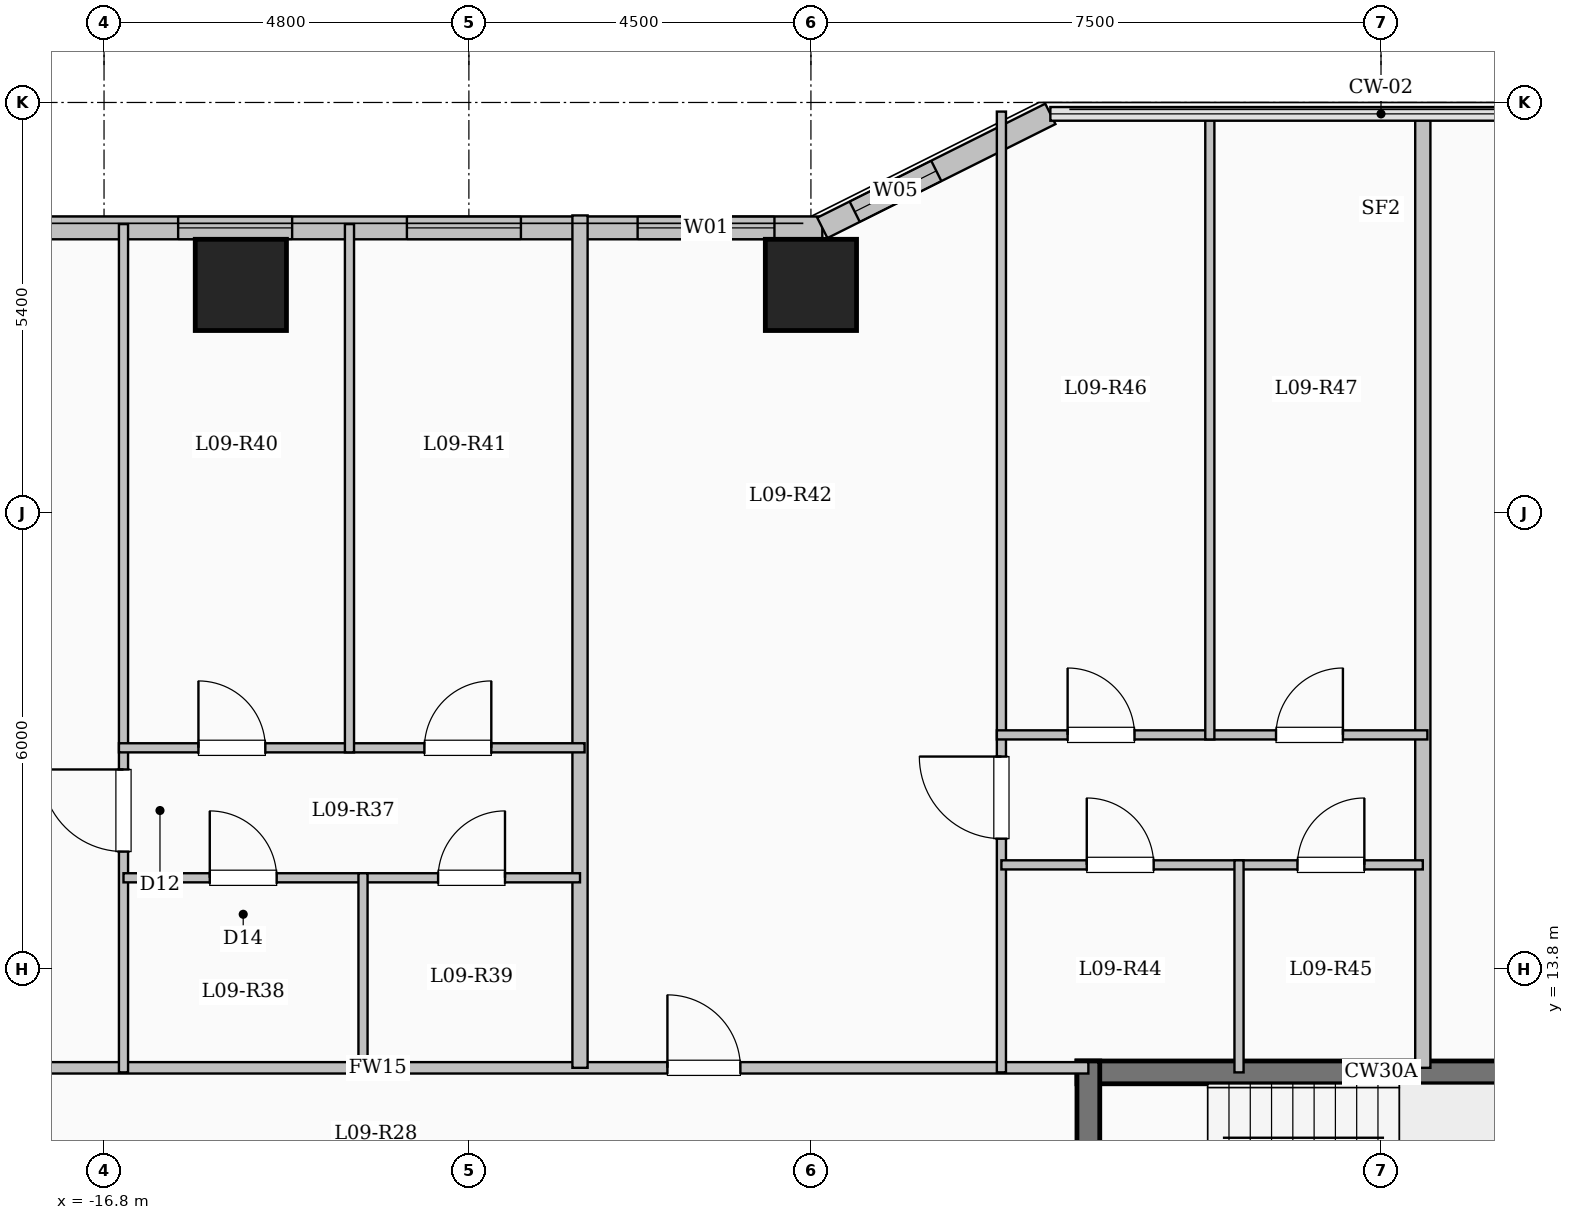
"""IFC4 building model, lengths in metres.
Left out: names, types, materials, properties, quantities, classifications, styles, units other than length and angle.
Written with IfcOpenShell. Run it as: python <this file> out.ifc"""

import sys

from ifc_helpers import new_model, si_unit, direction, frame, frame_2d, origin, origin_2d, place, context, subcontext, project, spatial, rectangle, extrude, element, fill, save


model = new_model("IFC4")
c1 = context("Model", 3, precision=1e-05, world=origin(), true_north=direction((0.0, 1.0)))
c2 = subcontext(c1, "Body", "Model", "MODEL_VIEW")
j1 = project(units=[si_unit("LENGTHUNIT", "METRE"), si_unit("PLANEANGLEUNIT", "RADIAN")], contexts=[c1])
p1 = place(None, origin())
s1 = spatial("IfcSite", under=j1, at=p1, CompositionType="ELEMENT")
p2 = place(p1, origin())
s2 = spatial("IfcBuilding", under=s1, at=p2, CompositionType="ELEMENT")
p3 = place(p2, frame((0.0, 0.0, 37.4)))
s3 = spatial("IfcBuildingStorey", under=s2, at=p3, CompositionType="ELEMENT", Elevation=37.4)
for number, where, z_axis, x_axis in (
    (1, (-15.0, 22.8, 0.0), (0.0, 0.0, 1.0), (1.0, 0.0, 0.0)),
    (2, (-7.5, 22.8, 0.0), (0.0, 0.0, 1.0), (1.0, 0.0, 0.0)),
):
    element("IfcColumn", number, at=place(p3, frame(where, z_axis=z_axis, x_axis=x_axis)), inside=s3, PredefinedType="COLUMN", context=c2, shape_type="SweptSolid", body=[
        extrude(rectangle(XDim=1.2, YDim=1.2, at=origin_2d()), origin(), (0.0, 0.0, 1.0), 3.35),
    ])
p4 = place(p3, frame((-22.65, 23.55, 0.0), z_axis=(0.0, 0.0, 1.0), x_axis=(1.0, 0.0, 0.0)))
e3 = element("IfcWall", 3, at=p4, inside=s3, PredefinedType="SOLIDWALL", context=c2, shape_type="SweptSolid", body=[
    extrude(rectangle(XDim=15.3, YDim=0.3, at=frame_2d((7.65, 0.0))), origin(), (0.0, 0.0, 1.0), 3.1),
])
p5 = place(p4, frame((1.885, 0.0, 0.9)))
e4 = element("IfcOpeningElement", 4, at=p5, cuts=e3, PredefinedType="OPENING", context=c2, shape_type="SweptSolid", body=[
    extrude(rectangle(XDim=2.4, YDim=1.8, at=frame_2d((1.2, 0.9))), frame((0.0, 0.16, 0.0), z_axis=(0.0, -1.0, 0.0), x_axis=(1.0, 0.0, 0.0)), (0.0, 0.0, 1.0), 0.32),
])
p6 = place(p4, frame((6.825, 0.0, 0.9)))
e5 = element("IfcOpeningElement", 5, at=p6, cuts=e3, PredefinedType="OPENING", context=c2, shape_type="SweptSolid", body=[
    extrude(rectangle(XDim=1.5, YDim=1.65, at=frame_2d((0.75, 0.825))), frame((0.0, 0.16, 0.0), z_axis=(0.0, -1.0, 0.0), x_axis=(1.0, 0.0, 0.0)), (0.0, 0.0, 1.0), 0.32),
])
p7 = place(p4, frame((9.835, 0.0, 0.9)))
e6 = element("IfcOpeningElement", 6, at=p7, cuts=e3, PredefinedType="OPENING", context=c2, shape_type="SweptSolid", body=[
    extrude(rectangle(XDim=1.5, YDim=1.65, at=frame_2d((0.75, 0.825))), frame((0.0, 0.16, 0.0), z_axis=(0.0, -1.0, 0.0), x_axis=(1.0, 0.0, 0.0)), (0.0, 0.0, 1.0), 0.32),
])
p8 = place(p4, frame((12.87, 0.0, 0.9)))
e7 = element("IfcOpeningElement", 7, at=p8, cuts=e3, PredefinedType="OPENING", context=c2, shape_type="SweptSolid", body=[
    extrude(rectangle(XDim=1.8, YDim=1.65, at=frame_2d((0.9, 0.825))), frame((0.0, 0.16, 0.0), z_axis=(0.0, -1.0, 0.0), x_axis=(1.0, 0.0, 0.0)), (0.0, 0.0, 1.0), 0.32),
])
p9 = place(p3, frame((-7.35, 23.55, 0.0), z_axis=(0.0, 0.0, 1.0), x_axis=(0.894427191, 0.4472135955, 0.0)))
e8 = element("IfcWall", 8, at=p9, inside=s3, PredefinedType="SOLIDWALL", context=c2, shape_type="SweptSolid", body=[
    extrude(rectangle(XDim=3.354, YDim=0.3, at=frame_2d((1.677, 0.0))), origin(), (0.0, 0.0, 1.0), 3.1),
])
p10 = place(p9, frame((0.476, 0.0, 0.95)))
e9 = element("IfcOpeningElement", 9, at=p10, cuts=e8, PredefinedType="OPENING", context=c2, shape_type="SweptSolid", body=[
    extrude(rectangle(XDim=1.2, YDim=1.5, at=frame_2d((0.6, 0.75))), frame((0.0, 0.16, 0.0), z_axis=(0.0, -1.0, 0.0), x_axis=(1.0, 0.0, 0.0)), (0.0, 0.0, 1.0), 0.32),
])
p11 = place(p3, frame((-4.0, 12.44, 0.0), z_axis=(0.0, 0.0, 1.0), x_axis=(1.0, 0.0, 0.0)))
e10 = element("IfcWall", 10, at=p11, inside=s3, PredefinedType="SHEAR", context=c2, shape_type="SweptSolid", body=[
    extrude(rectangle(XDim=8.0, YDim=0.3, at=frame_2d((4.0, 0.0))), origin(), (0.0, 0.0, 1.0), 3.35),
])
p12 = place(p3, frame((-3.85, 9.0, 0.0), z_axis=(0.0, 0.0, 1.0), x_axis=(0.0, 1.0, 0.0)))
e11 = element("IfcWall", 11, at=p12, inside=s3, PredefinedType="SHEAR", context=c2, shape_type="SweptSolid", body=[
    extrude(rectangle(XDim=3.59, YDim=0.3, at=frame_2d((1.795, 0.0))), origin(), (0.0, 0.0, 1.0), 3.35),
])
p13 = place(p3, frame((-22.55, 12.5, 0.0), z_axis=(0.0, 0.0, 1.0), x_axis=(1.0, 0.0, 0.0)))
e12 = element("IfcWall", 12, at=p13, inside=s3, PredefinedType="PARTITIONING", context=c2, shape_type="SweptSolid", body=[
    extrude(rectangle(XDim=18.7, YDim=0.15, at=frame_2d((9.35, 0.0))), origin(), (0.0, 0.0, 1.0), 3.1),
])
p14 = place(p13, frame((0.7, 0.0, 0.0)))
e13 = element("IfcOpeningElement", 13, at=p14, cuts=e12, PredefinedType="OPENING", context=c2, shape_type="SweptSolid", body=[
    extrude(rectangle(XDim=0.96, YDim=2.15, at=frame_2d((0.48, 1.075))), frame((0.0, 0.085, 0.0), z_axis=(0.0, -1.0, 0.0), x_axis=(1.0, 0.0, 0.0)), (0.0, 0.0, 1.0), 0.17),
])
p15 = place(p13, frame((13.162, 0.0, 0.0)))
e14 = element("IfcOpeningElement", 14, at=p15, cuts=e12, PredefinedType="OPENING", context=c2, shape_type="SweptSolid", body=[
    extrude(rectangle(XDim=0.96, YDim=2.15, at=frame_2d((0.48, 1.075))), frame((0.0, 0.085, 0.0), z_axis=(0.0, -1.0, 0.0), x_axis=(1.0, 0.0, 0.0)), (0.0, 0.0, 1.0), 0.17),
])
p16 = place(p3, frame((0.55, 12.5, 0.0), z_axis=(0.0, 0.0, 1.0), x_axis=(0.0, 1.0, 0.0)))
e15 = element("IfcWall", 15, at=p16, inside=s3, PredefinedType="SOLIDWALL", context=c2, shape_type="SweptSolid", body=[
    extrude(rectangle(XDim=12.58, YDim=0.2, at=frame_2d((6.29, 0.0))), origin(), (0.0, 0.0, 1.0), 3.1),
])
p17 = place(p3, frame((-10.538, 12.5, 0.0), z_axis=(0.0, 0.0, 1.0), x_axis=(0.0, 1.0, 0.0)))
e16 = element("IfcWall", 16, at=p17, inside=s3, PredefinedType="SOLIDWALL", context=c2, shape_type="SweptSolid", body=[
    extrude(rectangle(XDim=11.214, YDim=0.2, at=frame_2d((5.607, 0.0))), origin(), (0.0, 0.0, 1.0), 3.1),
])
p18 = place(p3, frame((-16.544, 12.44, 0.0), z_axis=(0.0, 0.0, 1.0), x_axis=(0.0, 1.0, 0.0)))
e17 = element("IfcWall", 17, at=p18, inside=s3, PredefinedType="PARTITIONING", context=c2, shape_type="SweptSolid", body=[
    extrude(rectangle(XDim=11.16, YDim=0.12, at=frame_2d((5.58, 0.0))), origin(), (0.0, 0.0, 1.0), 3.1),
])
p19 = place(p18, frame((2.905, 0.0, 0.0)))
e18 = element("IfcOpeningElement", 18, at=p19, cuts=e17, PredefinedType="OPENING", context=c2, shape_type="SweptSolid", body=[
    extrude(rectangle(XDim=1.08, YDim=2.15, at=frame_2d((0.54, 1.075))), frame((0.0, 0.07, 0.0), z_axis=(0.0, -1.0, 0.0), x_axis=(1.0, 0.0, 0.0)), (0.0, 0.0, 1.0), 0.14),
])
p20 = place(p3, frame((-16.544, 15.0, 0.0), z_axis=(0.0, 0.0, 1.0), x_axis=(1.0, 0.0, 0.0)))
e19 = element("IfcWall", 19, at=p20, inside=s3, PredefinedType="PARTITIONING", context=c2, shape_type="SweptSolid", body=[
    extrude(rectangle(XDim=3.151, YDim=0.12, at=frame_2d((1.575, 0.0))), origin(), (0.0, 0.0, 1.0), 2.585),
])
p21 = place(p20, frame((1.135, 0.0, 0.0)))
e20 = element("IfcOpeningElement", 20, at=p21, cuts=e19, PredefinedType="OPENING", context=c2, shape_type="SweptSolid", body=[
    extrude(rectangle(XDim=0.88, YDim=2.1, at=frame_2d((0.44, 1.05))), frame((0.0, 0.07, 0.0), z_axis=(0.0, -1.0, 0.0), x_axis=(1.0, 0.0, 0.0)), (0.0, 0.0, 1.0), 0.14),
])
p22 = place(p3, frame((-13.393, 15.0, 0.0), z_axis=(0.0, 0.0, 1.0), x_axis=(1.0, 0.0, 0.0)))
e21 = element("IfcWall", 21, at=p22, inside=s3, PredefinedType="PARTITIONING", context=c2, shape_type="SweptSolid", body=[
    extrude(rectangle(XDim=2.855, YDim=0.12, at=frame_2d((1.427, 0.0))), origin(), (0.0, 0.0, 1.0), 2.585),
])
p23 = place(p22, frame((0.988, 0.0, 0.0)))
e22 = element("IfcOpeningElement", 22, at=p23, cuts=e21, PredefinedType="OPENING", context=c2, shape_type="SweptSolid", body=[
    extrude(rectangle(XDim=0.88, YDim=2.1, at=frame_2d((0.44, 1.05))), frame((0.0, 0.07, 0.0), z_axis=(0.0, -1.0, 0.0), x_axis=(1.0, 0.0, 0.0)), (0.0, 0.0, 1.0), 0.14),
])
p24 = place(p3, frame((-16.604, 16.71, 0.0), z_axis=(0.0, 0.0, 1.0), x_axis=(1.0, 0.0, 0.0)))
e23 = element("IfcWall", 23, at=p24, inside=s3, PredefinedType="PARTITIONING", context=c2, shape_type="SweptSolid", body=[
    extrude(rectangle(XDim=6.126, YDim=0.12, at=frame_2d((3.063, 0.0))), origin(), (0.0, 0.0, 1.0), 2.585),
])
p25 = place(p24, frame((1.046, 0.0, 0.0)))
e24 = element("IfcOpeningElement", 24, at=p25, cuts=e23, PredefinedType="OPENING", context=c2, shape_type="SweptSolid", body=[
    extrude(rectangle(XDim=0.88, YDim=2.1, at=frame_2d((0.44, 1.05))), frame((0.0, 0.07, 0.0), z_axis=(0.0, -1.0, 0.0), x_axis=(1.0, 0.0, 0.0)), (0.0, 0.0, 1.0), 0.14),
])
p26 = place(p24, frame((4.019, 0.0, 0.0)))
e25 = element("IfcOpeningElement", 25, at=p26, cuts=e23, PredefinedType="OPENING", context=c2, shape_type="SweptSolid", body=[
    extrude(rectangle(XDim=0.88, YDim=2.1, at=frame_2d((0.44, 1.05))), frame((0.0, 0.07, 0.0), z_axis=(0.0, -1.0, 0.0), x_axis=(1.0, 0.0, 0.0)), (0.0, 0.0, 1.0), 0.14),
])
p27 = place(p3, frame((-13.393, 12.44, 0.0), z_axis=(0.0, 0.0, 1.0), x_axis=(0.0, 1.0, 0.0)))
e26 = element("IfcWall", 26, at=p27, inside=s3, PredefinedType="PARTITIONING", context=c2, shape_type="SweptSolid", body=[
    extrude(rectangle(XDim=2.62, YDim=0.12, at=frame_2d((1.31, 0.0))), origin(), (0.0, 0.0, 1.0), 3.1),
])
p28 = place(p3, frame((-13.571, 16.65, 0.0), z_axis=(0.0, 0.0, 1.0), x_axis=(0.0, 1.0, 0.0)))
e27 = element("IfcWall", 27, at=p28, inside=s3, PredefinedType="PARTITIONING", context=c2, shape_type="SweptSolid", body=[
    extrude(rectangle(XDim=6.95, YDim=0.12, at=frame_2d((3.475, 0.0))), origin(), (0.0, 0.0, 1.0), 3.1),
])
p29 = place(p3, frame((-4.994, 12.44, 0.0), z_axis=(0.0, 0.0, 1.0), x_axis=(0.0, 1.0, 0.0)))
e28 = element("IfcWall", 28, at=p29, inside=s3, PredefinedType="PARTITIONING", context=c2, shape_type="SweptSolid", body=[
    extrude(rectangle(XDim=12.64, YDim=0.12, at=frame_2d((6.32, 0.0))), origin(), (0.0, 0.0, 1.0), 3.1),
])
p30 = place(p29, frame((3.075, 0.0, 0.0)))
e29 = element("IfcOpeningElement", 29, at=p30, cuts=e28, PredefinedType="OPENING", context=c2, shape_type="SweptSolid", body=[
    extrude(rectangle(XDim=1.08, YDim=2.15, at=frame_2d((0.54, 1.075))), frame((0.0, 0.07, 0.0), z_axis=(0.0, -1.0, 0.0), x_axis=(1.0, 0.0, 0.0)), (0.0, 0.0, 1.0), 0.14),
])
p31 = place(p3, frame((-4.994, 15.17, 0.0), z_axis=(0.0, 0.0, 1.0), x_axis=(1.0, 0.0, 0.0)))
e30 = element("IfcWall", 30, at=p31, inside=s3, PredefinedType="PARTITIONING", context=c2, shape_type="SweptSolid", body=[
    extrude(rectangle(XDim=3.126, YDim=0.12, at=frame_2d((1.563, 0.0))), origin(), (0.0, 0.0, 1.0), 3.1),
])
p32 = place(p31, frame((1.123, 0.0, 0.0)))
e31 = element("IfcOpeningElement", 31, at=p32, cuts=e30, PredefinedType="OPENING", context=c2, shape_type="SweptSolid", body=[
    extrude(rectangle(XDim=0.88, YDim=2.1, at=frame_2d((0.44, 1.05))), frame((0.0, 0.07, 0.0), z_axis=(0.0, -1.0, 0.0), x_axis=(1.0, 0.0, 0.0)), (0.0, 0.0, 1.0), 0.14),
])
p33 = place(p3, frame((-1.868, 15.17, 0.0), z_axis=(0.0, 0.0, 1.0), x_axis=(1.0, 0.0, 0.0)))
e32 = element("IfcWall", 32, at=p33, inside=s3, PredefinedType="PARTITIONING", context=c2, shape_type="SweptSolid", body=[
    extrude(rectangle(XDim=2.418, YDim=0.12, at=frame_2d((1.209, 0.0))), origin(), (0.0, 0.0, 1.0), 3.1),
])
p34 = place(p33, frame((0.769, 0.0, 0.0)))
e33 = element("IfcOpeningElement", 33, at=p34, cuts=e32, PredefinedType="OPENING", context=c2, shape_type="SweptSolid", body=[
    extrude(rectangle(XDim=0.88, YDim=2.1, at=frame_2d((0.44, 1.05))), frame((0.0, 0.07, 0.0), z_axis=(0.0, -1.0, 0.0), x_axis=(1.0, 0.0, 0.0)), (0.0, 0.0, 1.0), 0.14),
])
p35 = place(p3, frame((-5.054, 16.88, 0.0), z_axis=(0.0, 0.0, 1.0), x_axis=(1.0, 0.0, 0.0)))
e34 = element("IfcWall", 34, at=p35, inside=s3, PredefinedType="PARTITIONING", context=c2, shape_type="SweptSolid", body=[
    extrude(rectangle(XDim=5.664, YDim=0.12, at=frame_2d((2.832, 0.0))), origin(), (0.0, 0.0, 1.0), 3.1),
])
p36 = place(p35, frame((0.931, 0.0, 0.0)))
e35 = element("IfcOpeningElement", 35, at=p36, cuts=e34, PredefinedType="OPENING", context=c2, shape_type="SweptSolid", body=[
    extrude(rectangle(XDim=0.88, YDim=2.1, at=frame_2d((0.44, 1.05))), frame((0.0, 0.07, 0.0), z_axis=(0.0, -1.0, 0.0), x_axis=(1.0, 0.0, 0.0)), (0.0, 0.0, 1.0), 0.14),
])
p37 = place(p35, frame((3.673, 0.0, 0.0)))
e36 = element("IfcOpeningElement", 36, at=p37, cuts=e34, PredefinedType="OPENING", context=c2, shape_type="SweptSolid", body=[
    extrude(rectangle(XDim=0.88, YDim=2.1, at=frame_2d((0.44, 1.05))), frame((0.0, 0.07, 0.0), z_axis=(0.0, -1.0, 0.0), x_axis=(1.0, 0.0, 0.0)), (0.0, 0.0, 1.0), 0.14),
])
p38 = place(p3, frame((-1.868, 12.44, 0.0), z_axis=(0.0, 0.0, 1.0), x_axis=(0.0, 1.0, 0.0)))
e37 = element("IfcWall", 37, at=p38, inside=s3, PredefinedType="PARTITIONING", context=c2, shape_type="SweptSolid", body=[
    extrude(rectangle(XDim=2.79, YDim=0.12, at=frame_2d((1.395, 0.0))), origin(), (0.0, 0.0, 1.0), 3.1),
])
p39 = place(p3, frame((-2.252, 16.82, 0.0), z_axis=(0.0, 0.0, 1.0), x_axis=(0.0, 1.0, 0.0)))
e38 = element("IfcWall", 38, at=p39, inside=s3, PredefinedType="PARTITIONING", context=c2, shape_type="SweptSolid", body=[
    extrude(rectangle(XDim=8.26, YDim=0.12, at=frame_2d((4.13, 0.0))), origin(), (0.0, 0.0, 1.0), 3.1),
])
p40 = place(p6, origin())
e39 = element("IfcWindow", 39, at=p40, inside=s3, PartitioningType="SINGLE_PANEL", PredefinedType="WINDOW", context=c2, shape_type="SweptSolid", body=[
    extrude(rectangle(XDim=1.5, YDim=1.65, at=frame_2d((0.75, 0.825))), frame((0.0, 0.03, 0.0), z_axis=(0.0, -1.0, 0.0), x_axis=(1.0, 0.0, 0.0)), (0.0, 0.0, 1.0), 0.06),
])
fill(e5, e39)
p41 = place(p7, origin())
e40 = element("IfcWindow", 40, at=p41, inside=s3, PartitioningType="SINGLE_PANEL", PredefinedType="WINDOW", context=c2, shape_type="SweptSolid", body=[
    extrude(rectangle(XDim=1.5, YDim=1.65, at=frame_2d((0.75, 0.825))), frame((0.0, 0.03, 0.0), z_axis=(0.0, -1.0, 0.0), x_axis=(1.0, 0.0, 0.0)), (0.0, 0.0, 1.0), 0.06),
])
fill(e6, e40)
p42 = place(p8, origin())
e41 = element("IfcWindow", 41, at=p42, inside=s3, PartitioningType="SINGLE_PANEL", PredefinedType="WINDOW", context=c2, shape_type="SweptSolid", body=[
    extrude(rectangle(XDim=1.8, YDim=1.65, at=frame_2d((0.9, 0.825))), frame((0.0, 0.03, 0.0), z_axis=(0.0, -1.0, 0.0), x_axis=(1.0, 0.0, 0.0)), (0.0, 0.0, 1.0), 0.06),
])
fill(e7, e41)
p43 = place(p10, origin())
e42 = element("IfcWindow", 42, at=p43, inside=s3, PartitioningType="SINGLE_PANEL", PredefinedType="WINDOW", context=c2, shape_type="SweptSolid", body=[
    extrude(rectangle(XDim=1.2, YDim=1.5, at=frame_2d((0.6, 0.75))), frame((0.0, 0.03, 0.0), z_axis=(0.0, -1.0, 0.0), x_axis=(1.0, 0.0, 0.0)), (0.0, 0.0, 1.0), 0.06),
])
fill(e9, e42)
p44 = place(p19, origin())
e43 = element("IfcDoor", 43, at=p44, inside=s3, OperationType="SINGLE_SWING_RIGHT", PredefinedType="DOOR", context=c2, shape_type="SweptSolid", body=[
    extrude(rectangle(XDim=1.08, YDim=2.15, at=frame_2d((0.54, 1.075))), frame((0.0, 0.025, 0.0), z_axis=(0.0, -1.0, 0.0), x_axis=(1.0, 0.0, 0.0)), (0.0, 0.0, 1.0), 0.05),
])
fill(e18, e43)
p45 = place(p21, origin())
e44 = element("IfcDoor", 44, at=p45, inside=s3, OperationType="SINGLE_SWING_LEFT", PredefinedType="DOOR", context=c2, shape_type="SweptSolid", body=[
    extrude(rectangle(XDim=0.88, YDim=2.1, at=frame_2d((0.44, 1.05))), frame((0.0, 0.025, 0.0), z_axis=(0.0, -1.0, 0.0), x_axis=(1.0, 0.0, 0.0)), (0.0, 0.0, 1.0), 0.05),
])
fill(e20, e44)
p46 = place(p23, origin())
e45 = element("IfcDoor", 45, at=p46, inside=s3, OperationType="SINGLE_SWING_RIGHT", PredefinedType="DOOR", context=c2, shape_type="SweptSolid", body=[
    extrude(rectangle(XDim=0.88, YDim=2.1, at=frame_2d((0.44, 1.05))), frame((0.0, 0.025, 0.0), z_axis=(0.0, -1.0, 0.0), x_axis=(1.0, 0.0, 0.0)), (0.0, 0.0, 1.0), 0.05),
])
fill(e22, e45)
p47 = place(p25, origin())
e46 = element("IfcDoor", 46, at=p47, inside=s3, OperationType="SINGLE_SWING_LEFT", PredefinedType="DOOR", context=c2, shape_type="SweptSolid", body=[
    extrude(rectangle(XDim=0.88, YDim=2.1, at=frame_2d((0.44, 1.05))), frame((0.0, 0.025, 0.0), z_axis=(0.0, -1.0, 0.0), x_axis=(1.0, 0.0, 0.0)), (0.0, 0.0, 1.0), 0.05),
])
fill(e24, e46)
p48 = place(p26, origin())
e47 = element("IfcDoor", 47, at=p48, inside=s3, OperationType="SINGLE_SWING_RIGHT", PredefinedType="DOOR", context=c2, shape_type="SweptSolid", body=[
    extrude(rectangle(XDim=0.88, YDim=2.1, at=frame_2d((0.44, 1.05))), frame((0.0, 0.025, 0.0), z_axis=(0.0, -1.0, 0.0), x_axis=(1.0, 0.0, 0.0)), (0.0, 0.0, 1.0), 0.05),
])
fill(e25, e47)
p49 = place(p15, origin())
e48 = element("IfcDoor", 48, at=p49, inside=s3, OperationType="SINGLE_SWING_LEFT", PredefinedType="DOOR", context=c2, shape_type="SweptSolid", body=[
    extrude(rectangle(XDim=0.96, YDim=2.15, at=frame_2d((0.48, 1.075))), frame((0.0, 0.025, 0.0), z_axis=(0.0, -1.0, 0.0), x_axis=(1.0, 0.0, 0.0)), (0.0, 0.0, 1.0), 0.05),
])
fill(e14, e48)
p50 = place(p30, origin())
e49 = element("IfcDoor", 49, at=p50, inside=s3, OperationType="SINGLE_SWING_RIGHT", PredefinedType="DOOR", context=c2, shape_type="SweptSolid", body=[
    extrude(rectangle(XDim=1.08, YDim=2.15, at=frame_2d((0.54, 1.075))), frame((0.0, 0.025, 0.0), z_axis=(0.0, -1.0, 0.0), x_axis=(1.0, 0.0, 0.0)), (0.0, 0.0, 1.0), 0.05),
])
fill(e29, e49)
p51 = place(p32, origin())
e50 = element("IfcDoor", 50, at=p51, inside=s3, OperationType="SINGLE_SWING_LEFT", PredefinedType="DOOR", context=c2, shape_type="SweptSolid", body=[
    extrude(rectangle(XDim=0.88, YDim=2.1, at=frame_2d((0.44, 1.05))), frame((0.0, 0.025, 0.0), z_axis=(0.0, -1.0, 0.0), x_axis=(1.0, 0.0, 0.0)), (0.0, 0.0, 1.0), 0.05),
])
fill(e31, e50)
p52 = place(p34, origin())
e51 = element("IfcDoor", 51, at=p52, inside=s3, OperationType="SINGLE_SWING_RIGHT", PredefinedType="DOOR", context=c2, shape_type="SweptSolid", body=[
    extrude(rectangle(XDim=0.88, YDim=2.1, at=frame_2d((0.44, 1.05))), frame((0.0, 0.025, 0.0), z_axis=(0.0, -1.0, 0.0), x_axis=(1.0, 0.0, 0.0)), (0.0, 0.0, 1.0), 0.05),
])
fill(e33, e51)
p53 = place(p36, origin())
e52 = element("IfcDoor", 52, at=p53, inside=s3, OperationType="SINGLE_SWING_LEFT", PredefinedType="DOOR", context=c2, shape_type="SweptSolid", body=[
    extrude(rectangle(XDim=0.88, YDim=2.1, at=frame_2d((0.44, 1.05))), frame((0.0, 0.025, 0.0), z_axis=(0.0, -1.0, 0.0), x_axis=(1.0, 0.0, 0.0)), (0.0, 0.0, 1.0), 0.05),
])
fill(e35, e52)
p54 = place(p37, origin())
e53 = element("IfcDoor", 53, at=p54, inside=s3, OperationType="SINGLE_SWING_RIGHT", PredefinedType="DOOR", context=c2, shape_type="SweptSolid", body=[
    extrude(rectangle(XDim=0.88, YDim=2.1, at=frame_2d((0.44, 1.05))), frame((0.0, 0.025, 0.0), z_axis=(0.0, -1.0, 0.0), x_axis=(1.0, 0.0, 0.0)), (0.0, 0.0, 1.0), 0.05),
])
fill(e36, e53)
save(model, sys.argv[1])
